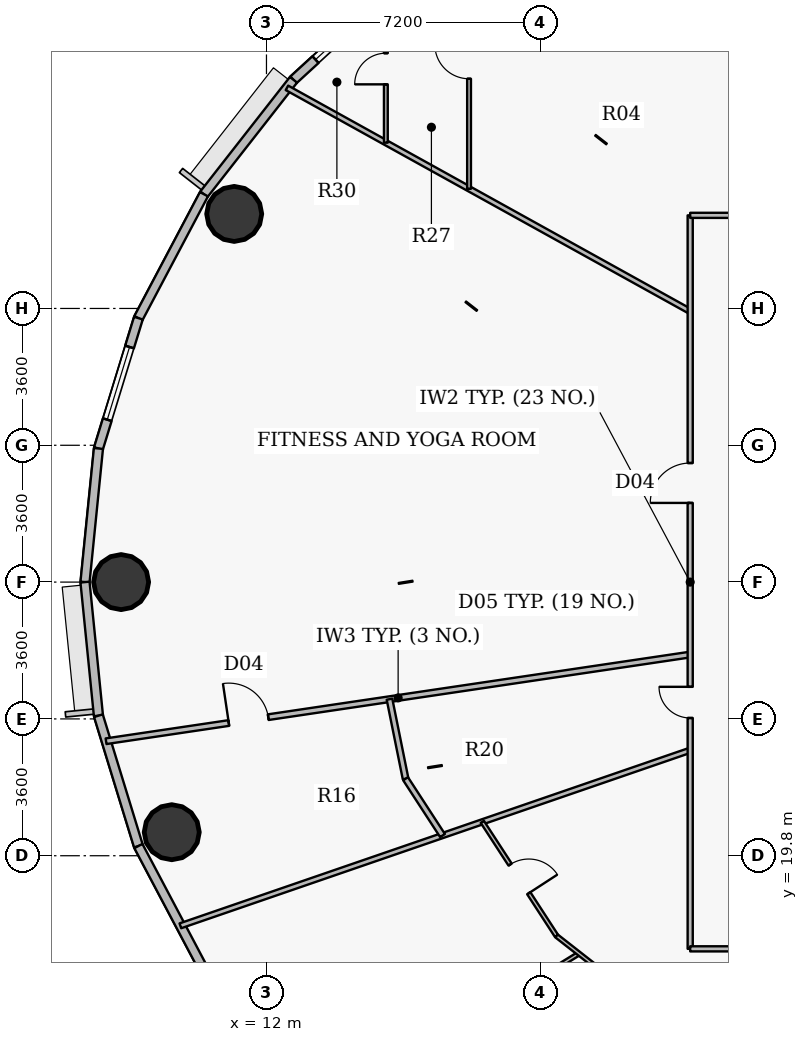
"""IFC4 building model, lengths in metres.
Left out: names, types, materials, properties, quantities, classifications, styles, units other than length and angle.
Written with IfcOpenShell. Run it as: python <this file> out.ifc"""

import sys

from ifc_helpers import new_model, si_unit, direction, frame, frame_2d, origin, origin_2d, place, context, subcontext, project, spatial, rectangle, hollow_circle, extrude, source, transform, mapped, element, fill, save


model = new_model("IFC4")
c1 = context("Model", 3, precision=1e-05, world=origin(), true_north=direction((0.0, 1.0)))
c2 = subcontext(c1, "Body", "Model", "MODEL_VIEW")
j1 = project(units=[si_unit("LENGTHUNIT", "METRE"), si_unit("PLANEANGLEUNIT", "RADIAN")], contexts=[c1])
p1 = place(None, origin())
s1 = spatial("IfcSite", under=j1, at=p1, CompositionType="ELEMENT")
p2 = place(p1, origin())
s2 = spatial("IfcBuilding", under=s1, at=p2, CompositionType="ELEMENT")
p3 = place(p2, frame((0.0, 0.0, 134.7)))
s3 = spatial("IfcBuildingStorey", under=s2, at=p3, CompositionType="ELEMENT", Elevation=134.7)
for number, where, z_axis, x_axis in (
    (1, (11.151, 36.688, 0.0), (0.0, 0.0, 1.0), (1.0, 0.0, 0.0)),
    (2, (8.175, 27.0, 0.0), (0.0, 0.0, 1.0), (1.0, 0.0, 0.0)),
    (3, (9.507, 20.419, 0.0), (0.0, 0.0, 1.0), (1.0, 0.0, 0.0)),
):
    element("IfcColumn", number, at=place(p3, frame(where, z_axis=z_axis, x_axis=x_axis)), inside=s3, PredefinedType="COLUMN", context=c2, shape_type="SweptSolid", body=[
        extrude(hollow_circle(Radius=0.725, WallThickness=0.042, at=origin_2d()), origin(), (0.0, 0.0, 1.0), 3.75),
    ])
p4 = place(p3, frame((12.711, 40.217, 0.0), z_axis=(0.0, 0.0, 1.0), x_axis=(0.737113356241, 0.675769117414, 0.0)))
e4 = element("IfcWall", 4, at=p4, inside=s3, PredefinedType="SOLIDWALL", context=c2, shape_type="SweptSolid", body=[
    extrude(rectangle(XDim=3.976, YDim=0.24, at=frame_2d((1.988, 0.0))), origin(), (0.0, 0.0, 1.0), 3.5),
])
p5 = place(p4, frame((0.787, 0.0, 0.9)))
e5 = element("IfcOpeningElement", 5, at=p5, cuts=e4, PredefinedType="OPENING", context=c2, shape_type="SweptSolid", body=[
    extrude(rectangle(XDim=2.0, YDim=1.75, at=origin_2d()), frame((1.0, 0.13, 0.875), z_axis=(0.0, -1.0, 0.0), x_axis=(1.0, 0.0, 0.0)), (0.0, 0.0, 1.0), 0.26),
])
p6 = place(p3, frame((10.355, 37.206, 0.0), z_axis=(0.0, 0.0, 1.0), x_axis=(0.616272103517, 0.787533297345, 0.0)))
e6 = element("IfcWall", 6, at=p6, inside=s3, PredefinedType="SOLIDWALL", context=c2, shape_type="SweptSolid", body=[
    extrude(rectangle(XDim=3.823, YDim=0.24, at=frame_2d((1.912, 0.0))), origin(), (0.0, 0.0, 1.0), 3.5),
])
p7 = place(p3, frame((8.63, 33.945, 0.0), z_axis=(0.0, 0.0, 1.0), x_axis=(0.467614004126, 0.883932770716, 0.0)))
e7 = element("IfcWall", 7, at=p7, inside=s3, PredefinedType="SOLIDWALL", context=c2, shape_type="SweptSolid", body=[
    extrude(rectangle(XDim=3.689, YDim=0.24, at=frame_2d((1.844, 0.0))), origin(), (0.0, 0.0, 1.0), 3.5),
])
p8 = place(p3, frame((7.578, 30.515, 0.0), z_axis=(0.0, 0.0, 1.0), x_axis=(0.293124431344, 0.956074300329, 0.0)))
e8 = element("IfcWall", 8, at=p8, inside=s3, PredefinedType="SOLIDWALL", context=c2, shape_type="SweptSolid", body=[
    extrude(rectangle(XDim=3.587, YDim=0.24, at=frame_2d((1.793, 0.0))), origin(), (0.0, 0.0, 1.0), 3.5),
])
p9 = place(p8, frame((0.794, 0.0, 0.9)))
e9 = element("IfcOpeningElement", 9, at=p9, cuts=e8, PredefinedType="OPENING", context=c2, shape_type="SweptSolid", body=[
    extrude(rectangle(XDim=2.0, YDim=1.75, at=origin_2d()), frame((1.0, 0.13, 0.875), z_axis=(0.0, -1.0, 0.0), x_axis=(1.0, 0.0, 0.0)), (0.0, 0.0, 1.0), 0.26),
])
for number, where, z_axis, x_axis in (
    (10, (7.225, 27.0, 0.0), (0.0, 0.0, 1.0), (0.1, 0.995, 0.0)),
    (11, (7.578, 23.485, 0.0), (0.0, 0.0, 1.0), (-0.1, 0.995, 0.0)),
):
    element("IfcWall", number, at=place(p3, frame(where, z_axis=z_axis, x_axis=x_axis)), inside=s3, PredefinedType="SOLIDWALL", context=c2, shape_type="SweptSolid", body=[
        extrude(rectangle(XDim=3.533, YDim=0.24, at=frame_2d((1.767, 0.0))), origin(), (0.0, 0.0, 1.0), 3.5),
    ])
p10 = place(p3, frame((8.63, 20.055, 0.0), z_axis=(0.0, 0.0, 1.0), x_axis=(-0.293124431344, 0.956074300329, 0.0)))
e12 = element("IfcWall", 12, at=p10, inside=s3, PredefinedType="SOLIDWALL", context=c2, shape_type="SweptSolid", body=[
    extrude(rectangle(XDim=3.587, YDim=0.24, at=frame_2d((1.793, 0.0))), origin(), (0.0, 0.0, 1.0), 3.5),
])
p11 = place(p3, frame((10.355, 16.794, 0.0), z_axis=(0.0, 0.0, 1.0), x_axis=(-0.467614004126, 0.883932770716, 0.0)))
e13 = element("IfcWall", 13, at=p11, inside=s3, PredefinedType="SOLIDWALL", context=c2, shape_type="SweptSolid", body=[
    extrude(rectangle(XDim=3.689, YDim=0.24, at=frame_2d((1.844, 0.0))), origin(), (0.0, 0.0, 1.0), 3.5),
])
p12 = place(p3, frame((7.779, 22.812, 0.0), z_axis=(0.0, 0.0, 1.0), x_axis=(0.989169524168, 0.146777561148, 0.0)))
e14 = element("IfcWall", 14, at=p12, inside=s3, PredefinedType="PARTITIONING", context=c2, shape_type="SweptSolid", body=[
    extrude(rectangle(XDim=15.539, YDim=0.15, at=frame_2d((7.77, 0.0))), origin(), (0.0, 0.0, 1.0), 2.935),
])
p13 = place(p12, frame((3.265, 0.0, 0.0)))
e15 = element("IfcOpeningElement", 15, at=p13, cuts=e14, PredefinedType="OPENING", context=c2, shape_type="SweptSolid", body=[
    extrude(rectangle(XDim=1.05, YDim=2.15, at=origin_2d()), frame((0.525, 0.085, 1.075), z_axis=(0.0, -1.0, 0.0), x_axis=(1.0, 0.0, 0.0)), (0.0, 0.0, 1.0), 0.17),
])
p14 = place(p3, frame((9.735, 17.956, 0.0), z_axis=(0.0, 0.0, 1.0), x_axis=(0.945515704768, 0.325576491836, 0.0)))
e16 = element("IfcWall", 16, at=p14, inside=s3, PredefinedType="PARTITIONING", context=c2, shape_type="SweptSolid", body=[
    extrude(rectangle(XDim=14.188, YDim=0.135, at=frame_2d((7.094, 0.0))), origin(), (0.0, 0.0, 1.0), 2.935),
])
p15 = place(p3, frame((12.539, 40.005, 0.0), z_axis=(0.0, 0.0, 1.0), x_axis=(0.874619146564, -0.484810631549, 0.0)))
e17 = element("IfcWall", 17, at=p15, inside=s3, PredefinedType="PARTITIONING", context=c2, shape_type="SweptSolid", body=[
    extrude(rectangle(XDim=12.132, YDim=0.135, at=frame_2d((6.066, 0.0))), origin(), (0.0, 0.0, 1.0), 2.935),
])
p16 = place(p3, frame((13.494, 13.059, 0.0), z_axis=(0.0, 0.0, 1.0), x_axis=(0.850110644983, 0.526604112486, 0.0)))
e18 = element("IfcWall", 18, at=p16, inside=s3, PredefinedType="PARTITIONING", context=c2, shape_type="SweptSolid", body=[
    extrude(rectangle(XDim=7.916, YDim=0.1, at=frame_2d((3.958, 0.0))), origin(), (0.0, 0.0, 1.0), 2.935),
])
p17 = place(p3, frame((15.142, 38.562, 0.0), z_axis=(0.0, 0.0, 1.0), x_axis=(0.0, 1.0, 0.0)))
e19 = element("IfcWall", 19, at=p17, inside=s3, PredefinedType="PARTITIONING", context=c2, shape_type="SweptSolid", body=[
    extrude(rectangle(XDim=3.89, YDim=0.1, at=frame_2d((1.945, 0.0))), origin(), (0.0, 0.0, 1.0), 2.935),
])
p18 = place(p17, frame((1.535, 0.0, 0.0)))
e20 = element("IfcOpeningElement", 20, at=p18, cuts=e19, PredefinedType="OPENING", context=c2, shape_type="SweptSolid", body=[
    extrude(rectangle(XDim=0.82, YDim=2.1, at=origin_2d()), frame((0.41, 0.06, 1.05), z_axis=(0.0, -1.0, 0.0), x_axis=(1.0, 0.0, 0.0)), (0.0, 0.0, 1.0), 0.12),
])
p19 = place(p3, frame((15.237, 23.919, 0.0), z_axis=(0.0, 0.0, 1.0), x_axis=(0.198269330309, -0.98014757698, 0.0)))
e21 = element("IfcWall", 21, at=p19, inside=s3, PredefinedType="PARTITIONING", context=c2, shape_type="SweptSolid", body=[
    extrude(rectangle(XDim=2.136, YDim=0.15, at=frame_2d((1.068, 0.0))), origin(), (0.0, 0.0, 1.0), 2.935),
])
p20 = place(p3, frame((15.661, 21.825, 0.0), z_axis=(0.0, 0.0, 1.0), x_axis=(0.54543603077, -0.838152454114, 0.0)))
e22 = element("IfcWall", 22, at=p20, inside=s3, PredefinedType="PARTITIONING", context=c2, shape_type="SweptSolid", body=[
    extrude(rectangle(XDim=1.782, YDim=0.15, at=frame_2d((0.891, 0.0))), origin(), (0.0, 0.0, 1.0), 2.935),
])
p21 = place(p3, frame((17.331, 37.348, 0.0), z_axis=(0.0, 0.0, 1.0), x_axis=(0.0, 1.0, 0.0)))
e23 = element("IfcWall", 23, at=p21, inside=s3, PredefinedType="PARTITIONING", context=c2, shape_type="SweptSolid", body=[
    extrude(rectangle(XDim=6.691, YDim=0.1, at=frame_2d((3.345, 0.0))), origin(), (0.0, 0.0, 1.0), 2.935),
])
p22 = place(p21, frame((2.895, 0.0, 0.0)))
e24 = element("IfcOpeningElement", 24, at=p22, cuts=e23, PredefinedType="OPENING", context=c2, shape_type="SweptSolid", body=[
    extrude(rectangle(XDim=0.9, YDim=2.1, at=origin_2d()), frame((0.45, 0.06, 1.05), z_axis=(0.0, -1.0, 0.0), x_axis=(1.0, 0.0, 0.0)), (0.0, 0.0, 1.0), 0.12),
])
p23 = place(p3, frame((17.68, 20.692, 0.0), z_axis=(0.0, 0.0, 1.0), x_axis=(0.545371539428, -0.838194418964, 0.0)))
e25 = element("IfcWall", 25, at=p23, inside=s3, PredefinedType="PARTITIONING", context=c2, shape_type="SweptSolid", body=[
    extrude(rectangle(XDim=3.583, YDim=0.1, at=frame_2d((1.791, 0.0))), origin(), (0.0, 0.0, 1.0), 3.5),
])
p24 = place(p23, frame((1.341, 0.0, 0.0)))
e26 = element("IfcOpeningElement", 26, at=p24, cuts=e25, PredefinedType="OPENING", context=c2, shape_type="SweptSolid", body=[
    extrude(rectangle(XDim=0.9, YDim=2.1, at=origin_2d()), frame((0.45, 0.06, 1.05), z_axis=(0.0, -1.0, 0.0), x_axis=(1.0, 0.0, 0.0)), (0.0, 0.0, 1.0), 0.12),
])
p25 = place(p3, frame((19.634, 17.689, 0.0), z_axis=(0.0, 0.0, 1.0), x_axis=(0.787341639438, -0.616516944461, 0.0)))
e27 = element("IfcWall", 27, at=p25, inside=s3, PredefinedType="PARTITIONING", context=c2, shape_type="SweptSolid", body=[
    extrude(rectangle(XDim=4.069, YDim=0.1, at=frame_2d((2.034, 0.0))), origin(), (0.0, 0.0, 1.0), 2.935),
])
p26 = place(p3, frame((21.01, 46.133, 0.0), z_axis=(0.0, 0.0, 1.0), x_axis=(0.616738538538, -0.787168072956, 0.0)))
e28 = element("IfcWall", 28, at=p26, inside=s3, PredefinedType="PARTITIONING", context=c2, shape_type="SweptSolid", body=[
    extrude(rectangle(XDim=7.312, YDim=0.1, at=frame_2d((3.656, 0.0))), origin(), (0.0, 0.0, 1.0), 2.935),
])
p27 = place(p26, frame((3.206, 0.0, 0.0)))
e29 = element("IfcOpeningElement", 29, at=p27, cuts=e28, PredefinedType="OPENING", context=c2, shape_type="SweptSolid", body=[
    extrude(rectangle(XDim=0.9, YDim=2.1, at=origin_2d()), frame((0.45, 0.06, 1.05), z_axis=(0.0, -1.0, 0.0), x_axis=(1.0, 0.0, 0.0)), (0.0, 0.0, 1.0), 0.12),
])
p28 = place(p3, frame((23.15, 17.35, 0.0), z_axis=(0.0, 0.0, 1.0), x_axis=(0.0, 1.0, 0.0)))
e30 = element("IfcWall", 30, at=p28, inside=s3, PredefinedType="PARTITIONING", context=c2, shape_type="SweptSolid", body=[
    extrude(rectangle(XDim=19.3, YDim=0.135, at=frame_2d((9.65, 0.0))), origin(), (0.0, 0.0, 1.0), 2.935),
])
p29 = place(p28, frame((11.733, 0.0, 0.0)))
e31 = element("IfcOpeningElement", 31, at=p29, cuts=e30, PredefinedType="OPENING", context=c2, shape_type="SweptSolid", body=[
    extrude(rectangle(XDim=1.05, YDim=2.15, at=origin_2d()), frame((0.525, 0.078, 1.075), z_axis=(0.0, -1.0, 0.0), x_axis=(1.0, 0.0, 0.0)), (0.0, 0.0, 1.0), 0.155),
])
p30 = place(p28, frame((6.074, 0.0, 0.0)))
e32 = element("IfcOpeningElement", 32, at=p30, cuts=e30, PredefinedType="OPENING", context=c2, shape_type="SweptSolid", body=[
    extrude(rectangle(XDim=0.82, YDim=2.1, at=origin_2d()), frame((0.41, 0.078, 1.05), z_axis=(0.0, -1.0, 0.0), x_axis=(1.0, 0.0, 0.0)), (0.0, 0.0, 1.0), 0.155),
])
p31 = place(p3, frame((23.15, 17.35, 0.0), z_axis=(0.0, 0.0, 1.0), x_axis=(1.0, 0.0, 0.0)))
e33 = element("IfcWall", 33, at=p31, inside=s3, PredefinedType="PARTITIONING", context=c2, shape_type="SweptSolid", body=[
    extrude(rectangle(XDim=8.318, YDim=0.135, at=frame_2d((4.159, 0.0))), origin(), (0.0, 0.0, 1.0), 2.935),
])
p32 = place(p31, frame((3.659, 0.0, 0.0)))
e34 = element("IfcOpeningElement", 34, at=p32, cuts=e33, PredefinedType="OPENING", context=c2, shape_type="SweptSolid", body=[
    extrude(rectangle(XDim=1.0, YDim=2.15, at=origin_2d()), frame((0.5, 0.078, 1.075), z_axis=(0.0, -1.0, 0.0), x_axis=(1.0, 0.0, 0.0)), (0.0, 0.0, 1.0), 0.155),
])
p33 = place(p3, frame((23.15, 36.65, 0.0), z_axis=(0.0, 0.0, 1.0), x_axis=(1.0, 0.0, 0.0)))
e35 = element("IfcWall", 35, at=p33, inside=s3, PredefinedType="PARTITIONING", context=c2, shape_type="SweptSolid", body=[
    extrude(rectangle(XDim=10.236, YDim=0.135, at=frame_2d((5.118, 0.0))), origin(), (0.0, 0.0, 1.0), 2.935),
])
p34 = place(p33, frame((4.618, 0.0, 0.0)))
e36 = element("IfcOpeningElement", 36, at=p34, cuts=e35, PredefinedType="OPENING", context=c2, shape_type="SweptSolid", body=[
    extrude(rectangle(XDim=1.0, YDim=2.15, at=origin_2d()), frame((0.5, 0.078, 1.075), z_axis=(0.0, -1.0, 0.0), x_axis=(1.0, 0.0, 0.0)), (0.0, 0.0, 1.0), 0.155),
])
m1 = source(origin(), c2, "Body", "SweptSolid", [
    extrude(rectangle(XDim=2.0, YDim=1.75, at=origin_2d()), frame((1.0, 0.03, 0.875), z_axis=(0.0, -1.0, 0.0), x_axis=(1.0, 0.0, 0.0)), (0.0, 0.0, 1.0), 0.06),
])
p35 = place(p5, origin())
e37 = element("IfcWindow", 37, at=p35, inside=s3, PartitioningType="DOUBLE_PANEL_VERTICAL", PredefinedType="WINDOW", context=c2, shape_type="MappedRepresentation", body=[
    mapped(m1, transform((0.0, 0.0, 0.0), x_axis=(1.0, 0.0, 0.0), y_axis=(0.0, 1.0, 0.0), z_axis=(0.0, 0.0, 1.0), scale=1.0)),
])
fill(e5, e37)
p36 = place(p9, origin())
e38 = element("IfcWindow", 38, at=p36, inside=s3, PartitioningType="DOUBLE_PANEL_VERTICAL", PredefinedType="WINDOW", context=c2, shape_type="MappedRepresentation", body=[
    mapped(m1, transform((0.0, 0.0, 0.0), x_axis=(1.0, 0.0, 0.0), y_axis=(0.0, 1.0, 0.0), z_axis=(0.0, 0.0, 1.0), scale=1.0)),
])
fill(e9, e38)
m2 = source(origin(), c2, "Body", "SweptSolid", [
    extrude(rectangle(XDim=0.9, YDim=2.1, at=origin_2d()), frame((0.45, 0.025, 1.05), z_axis=(0.0, -1.0, 0.0), x_axis=(1.0, 0.0, 0.0)), (0.0, 0.0, 1.0), 0.05),
])
p37 = place(p24, origin())
e39 = element("IfcDoor", 39, at=p37, inside=s3, OperationType="SINGLE_SWING_RIGHT", PredefinedType="DOOR", context=c2, shape_type="MappedRepresentation", body=[
    mapped(m2, transform((0.0, 0.0, 0.0), x_axis=(1.0, 0.0, 0.0), y_axis=(0.0, 1.0, 0.0), z_axis=(0.0, 0.0, 1.0), scale=1.0)),
])
fill(e26, e39)
p38 = place(p22, origin())
e40 = element("IfcDoor", 40, at=p38, inside=s3, OperationType="SINGLE_SWING_RIGHT", PredefinedType="DOOR", context=c2, shape_type="MappedRepresentation", body=[
    mapped(m2, transform((0.0, 0.0, 0.0), x_axis=(1.0, 0.0, 0.0), y_axis=(0.0, 1.0, 0.0), z_axis=(0.0, 0.0, 1.0), scale=1.0)),
])
fill(e24, e40)
m3 = source(origin(), c2, "Body", "SweptSolid", [
    extrude(rectangle(XDim=0.82, YDim=2.1, at=origin_2d()), frame((0.41, 0.025, 1.05), z_axis=(0.0, -1.0, 0.0), x_axis=(1.0, 0.0, 0.0)), (0.0, 0.0, 1.0), 0.05),
])
p39 = place(p18, origin())
e41 = element("IfcDoor", 41, at=p39, inside=s3, OperationType="SINGLE_SWING_LEFT", PredefinedType="DOOR", context=c2, shape_type="MappedRepresentation", body=[
    mapped(m3, transform((0.0, 0.0, 0.0), x_axis=(1.0, 0.0, 0.0), y_axis=(0.0, 1.0, 0.0), z_axis=(0.0, 0.0, 1.0), scale=1.0)),
])
fill(e20, e41)
m4 = source(origin(), c2, "Body", "SweptSolid", [
    extrude(rectangle(XDim=1.05, YDim=2.15, at=origin_2d()), frame((0.525, 0.025, 1.075), z_axis=(0.0, -1.0, 0.0), x_axis=(1.0, 0.0, 0.0)), (0.0, 0.0, 1.0), 0.05),
])
p40 = place(p29, origin())
e42 = element("IfcDoor", 42, at=p40, inside=s3, OperationType="SINGLE_SWING_LEFT", PredefinedType="DOOR", context=c2, shape_type="MappedRepresentation", body=[
    mapped(m4, transform((0.0, 0.0, 0.0), x_axis=(1.0, 0.0, 0.0), y_axis=(0.0, 1.0, 0.0), z_axis=(0.0, 0.0, 1.0), scale=1.0)),
])
fill(e31, e42)
p41 = place(p30, origin())
e43 = element("IfcDoor", 43, at=p41, inside=s3, OperationType="SINGLE_SWING_RIGHT", PredefinedType="DOOR", context=c2, shape_type="MappedRepresentation", body=[
    mapped(m3, transform((0.0, 0.0, 0.0), x_axis=(1.0, 0.0, 0.0), y_axis=(0.0, 1.0, 0.0), z_axis=(0.0, 0.0, 1.0), scale=1.0)),
])
fill(e32, e43)
p42 = place(p13, origin())
e44 = element("IfcDoor", 44, at=p42, inside=s3, OperationType="SINGLE_SWING_LEFT", PredefinedType="DOOR", context=c2, shape_type="MappedRepresentation", body=[
    mapped(m4, transform((0.0, 0.0, 0.0), x_axis=(1.0, 0.0, 0.0), y_axis=(0.0, 1.0, 0.0), z_axis=(0.0, 0.0, 1.0), scale=1.0)),
])
fill(e15, e44)
save(model, sys.argv[1])
